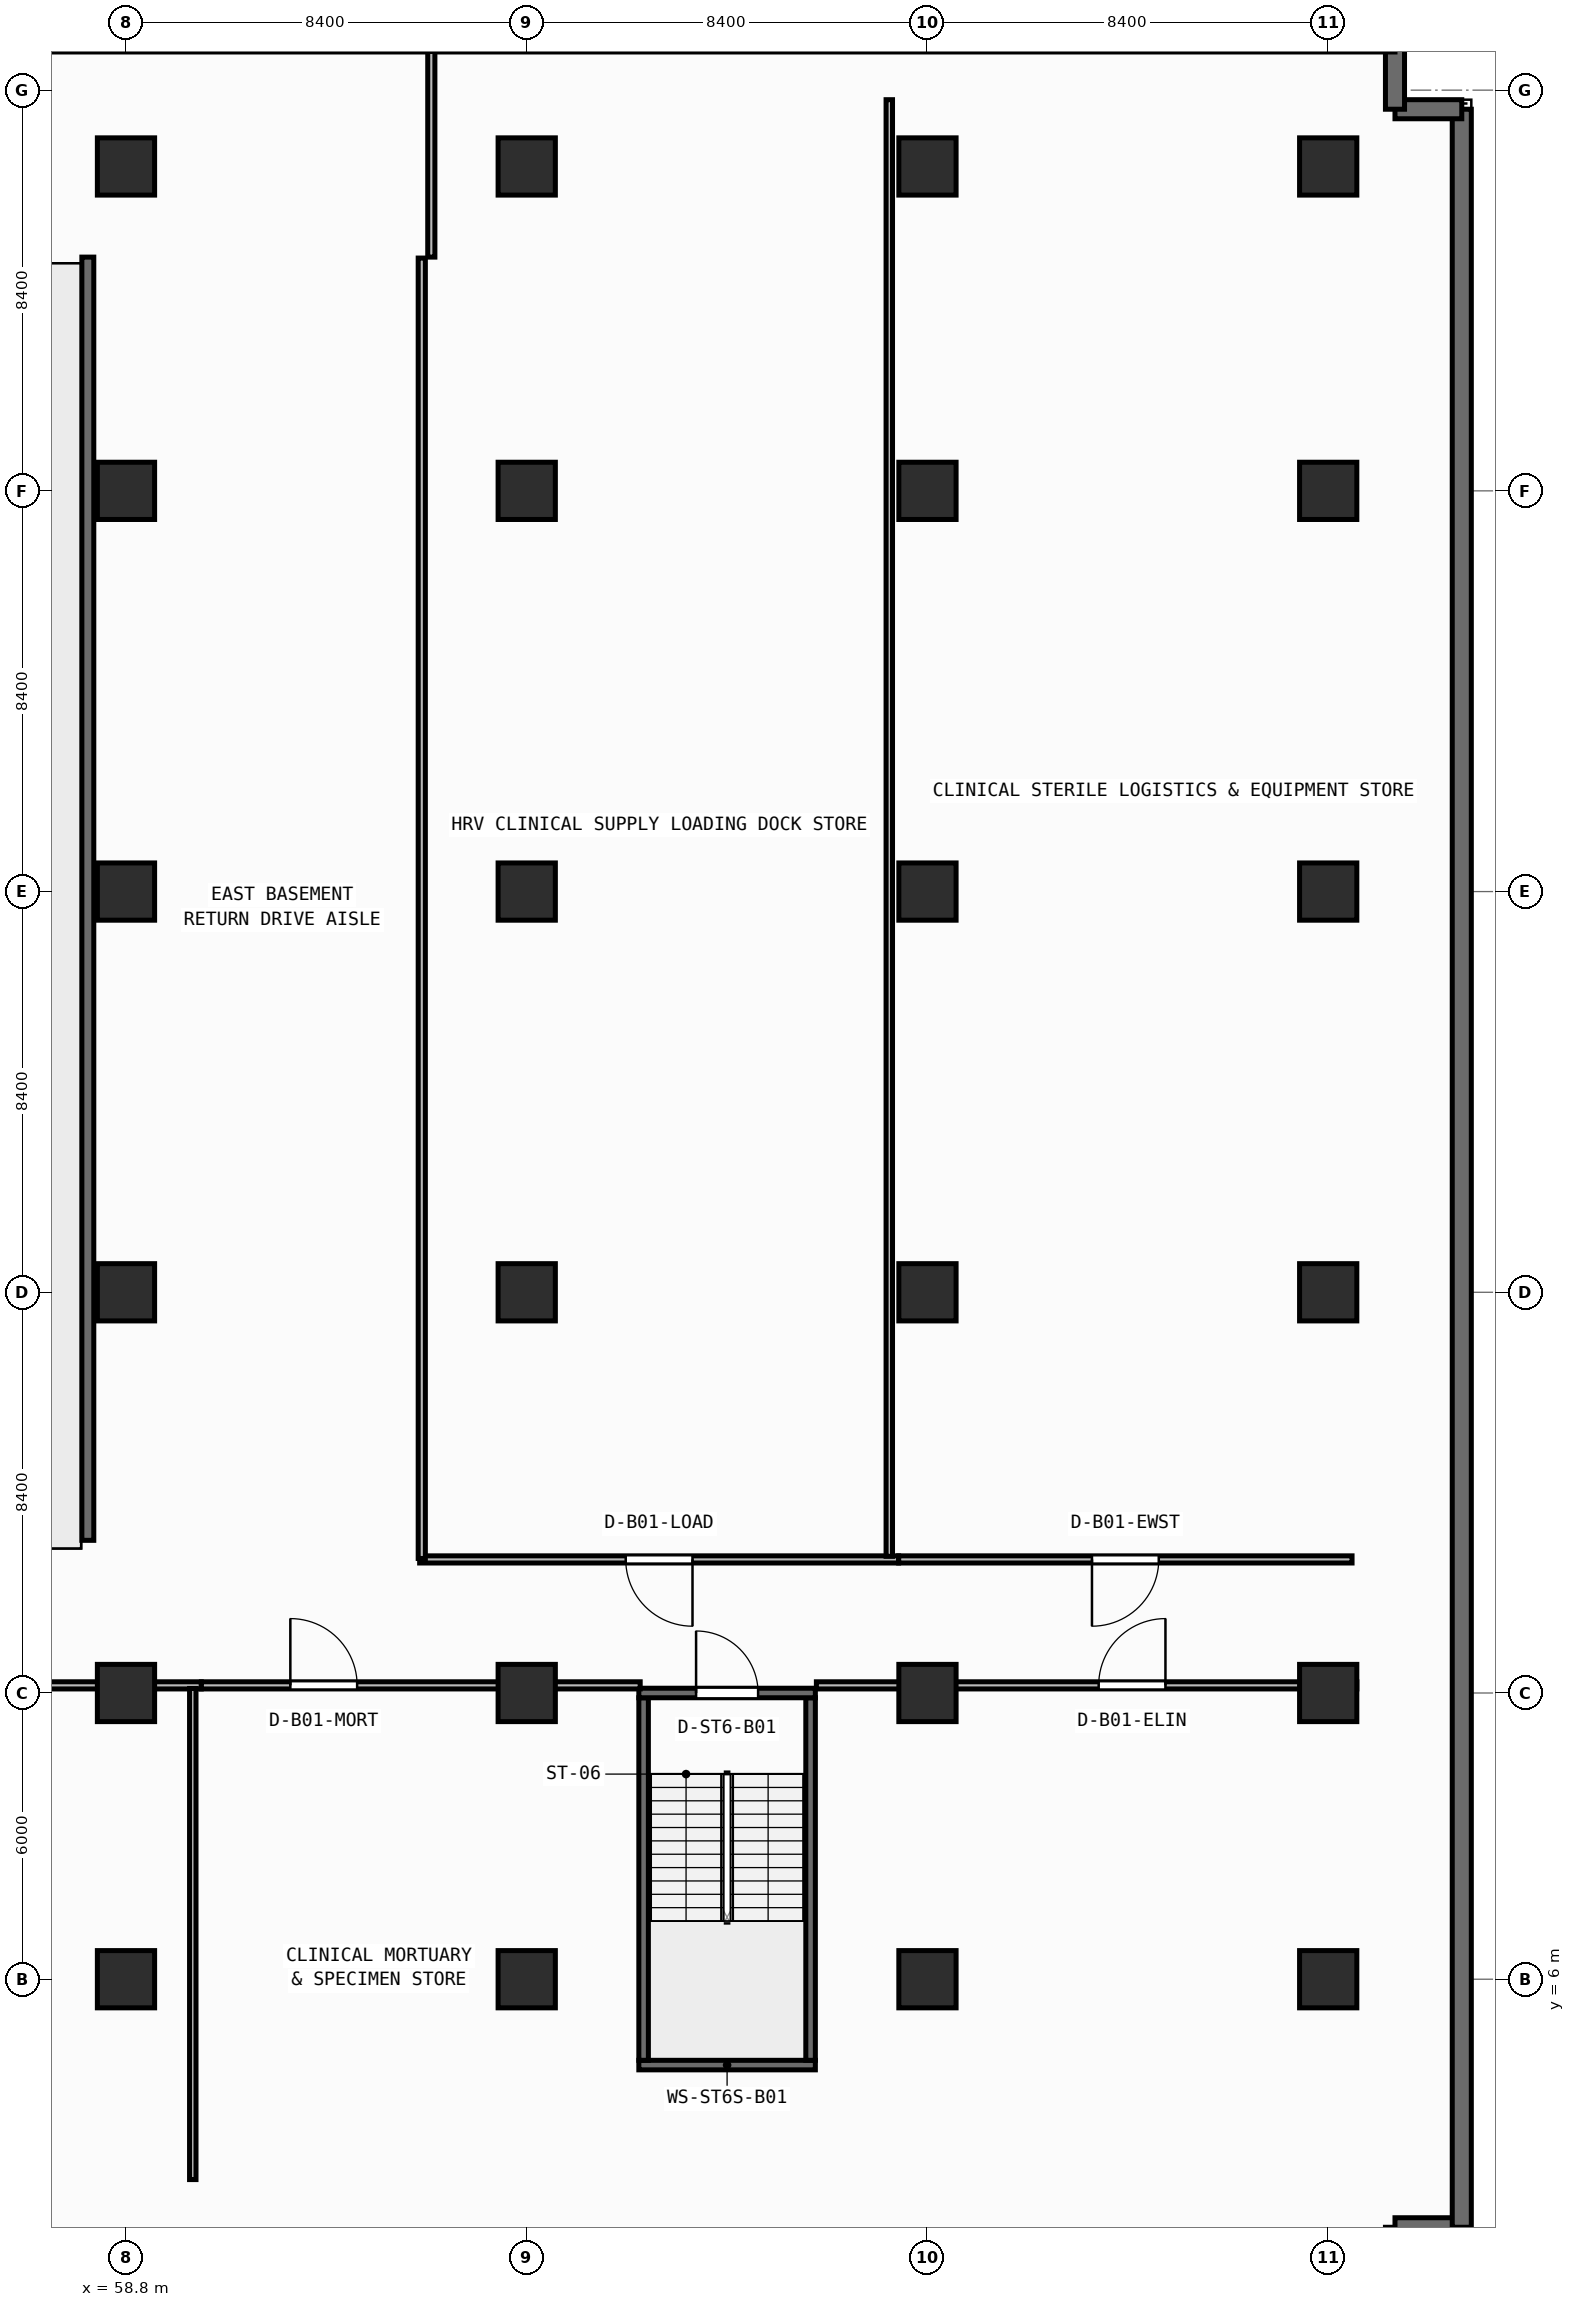
"""IFC4 building model, lengths in metres.
Left out: names, types, materials, properties, quantities, classifications, styles, units other than length and angle.
Written with IfcOpenShell. Run it as: python <this file> out.ifc"""

import sys

from ifc_helpers import new_model, si_unit, direction, frame, frame_2d, origin, origin_2d, place, context, subcontext, project, spatial, rectangle, extrude, element, fill, save


model = new_model("IFC4")
c1 = context("Model", 3, precision=1e-05, world=origin(), true_north=direction((0.0, 1.0)))
c2 = subcontext(c1, "Body", "Model", "MODEL_VIEW")
j1 = project(units=[si_unit("LENGTHUNIT", "METRE"), si_unit("PLANEANGLEUNIT", "RADIAN")], contexts=[c1])
p1 = place(None, origin())
s1 = spatial("IfcSite", under=j1, at=p1, CompositionType="ELEMENT")
p2 = place(p1, origin())
s2 = spatial("IfcBuilding", under=s1, at=p2, CompositionType="ELEMENT")
p3 = place(p2, frame((0.0, 0.0, -4.5)))
s3 = spatial("IfcBuildingStorey", under=s2, at=p3, CompositionType="ELEMENT", Elevation=-4.5)
for number, where, z_axis, x_axis in (
    (1, (58.8, 6.0, 0.0), (0.0, 0.0, 1.0), (1.0, 0.0, 0.0)),
    (2, (67.2, 6.0, 0.0), (0.0, 0.0, 1.0), (1.0, 0.0, 0.0)),
    (3, (75.6, 6.0, 0.0), (0.0, 0.0, 1.0), (1.0, 0.0, 0.0)),
    (4, (84.0, 6.0, 0.0), (0.0, 0.0, 1.0), (1.0, 0.0, 0.0)),
    (5, (58.8, 12.0, 0.0), (0.0, 0.0, 1.0), (1.0, 0.0, 0.0)),
    (6, (67.2, 12.0, 0.0), (0.0, 0.0, 1.0), (1.0, 0.0, 0.0)),
    (7, (75.6, 12.0, 0.0), (0.0, 0.0, 1.0), (1.0, 0.0, 0.0)),
    (8, (84.0, 12.0, 0.0), (0.0, 0.0, 1.0), (1.0, 0.0, 0.0)),
    (9, (58.8, 20.4, 0.0), (0.0, 0.0, 1.0), (1.0, 0.0, 0.0)),
    (10, (67.2, 20.4, 0.0), (0.0, 0.0, 1.0), (1.0, 0.0, 0.0)),
    (11, (75.6, 20.4, 0.0), (0.0, 0.0, 1.0), (1.0, 0.0, 0.0)),
    (12, (84.0, 20.4, 0.0), (0.0, 0.0, 1.0), (1.0, 0.0, 0.0)),
    (13, (58.8, 28.8, 0.0), (0.0, 0.0, 1.0), (1.0, 0.0, 0.0)),
    (14, (67.2, 28.8, 0.0), (0.0, 0.0, 1.0), (1.0, 0.0, 0.0)),
    (15, (75.6, 28.8, 0.0), (0.0, 0.0, 1.0), (1.0, 0.0, 0.0)),
    (16, (84.0, 28.8, 0.0), (0.0, 0.0, 1.0), (1.0, 0.0, 0.0)),
    (17, (58.8, 37.2, 0.0), (0.0, 0.0, 1.0), (1.0, 0.0, 0.0)),
    (18, (67.2, 37.2, 0.0), (0.0, 0.0, 1.0), (1.0, 0.0, 0.0)),
    (19, (75.6, 37.2, 0.0), (0.0, 0.0, 1.0), (1.0, 0.0, 0.0)),
    (20, (84.0, 37.2, 0.0), (0.0, 0.0, 1.0), (1.0, 0.0, 0.0)),
    (21, (58.8, 44.0, 0.0), (0.0, 0.0, 1.0), (1.0, 0.0, 0.0)),
    (22, (67.2, 44.0, 0.0), (0.0, 0.0, 1.0), (1.0, 0.0, 0.0)),
    (23, (75.6, 44.0, 0.0), (0.0, 0.0, 1.0), (1.0, 0.0, 0.0)),
    (24, (84.0, 44.0, 0.0), (0.0, 0.0, 1.0), (1.0, 0.0, 0.0)),
):
    element("IfcColumn", number, at=place(p3, frame(where, z_axis=z_axis, x_axis=x_axis)), inside=s3, PredefinedType="COLUMN", context=c2, shape_type="SweptSolid", body=[
        extrude(rectangle(XDim=1.2, YDim=1.2, at=origin_2d()), origin(), (0.0, 0.0, 1.0), 4.5),
    ])
for number, where, z_axis, x_axis in (
    (25, (85.4, -0.6, 0.0), (0.0, 0.0, 1.0), (0.0, 1.0, 0.0)),
    (26, (85.4, 0.8, 0.0), (0.0, 0.0, 1.0), (1.0, 0.0, 0.0)),
):
    element("IfcWall", number, at=place(p3, frame(where, z_axis=z_axis, x_axis=x_axis)), inside=s3, PredefinedType="STANDARD", context=c2, shape_type="SweptSolid", body=[
        extrude(rectangle(XDim=1.4, YDim=0.4, at=frame_2d((0.7, 0.0))), origin(), (0.0, 0.0, 1.0), 4.25),
    ])
p4 = place(p3, frame((86.8, 0.8, 0.0), z_axis=(0.0, 0.0, 1.0), x_axis=(0.0, 1.0, 0.0)))
e27 = element("IfcWall", 27, at=p4, inside=s3, PredefinedType="STANDARD", context=c2, shape_type="SweptSolid", body=[
    extrude(rectangle(XDim=44.4, YDim=0.4, at=frame_2d((22.2, 0.0))), origin(), (0.0, 0.0, 1.0), 4.25),
])
for number, where, z_axis, x_axis in (
    (28, (86.8, 45.2, 0.0), (0.0, 0.0, 1.0), (-1.0, 0.0, 0.0)),
    (29, (85.4, 45.2, 0.0), (0.0, 0.0, 1.0), (0.0, 1.0, 0.0)),
):
    element("IfcWall", number, at=place(p3, frame(where, z_axis=z_axis, x_axis=x_axis)), inside=s3, PredefinedType="STANDARD", context=c2, shape_type="SweptSolid", body=[
        extrude(rectangle(XDim=1.4, YDim=0.4, at=frame_2d((0.7, 0.0))), origin(), (0.0, 0.0, 1.0), 4.25),
    ])
p5 = place(p3, frame((69.55, 4.2, 0.0), z_axis=(0.0, 0.0, 1.0), x_axis=(1.0, 0.0, 0.0)))
e30 = element("IfcWall", 30, at=p5, inside=s3, PredefinedType="SHEAR", context=c2, shape_type="SweptSolid", body=[
    extrude(rectangle(XDim=3.7, YDim=0.2, at=frame_2d((1.85, 0.0))), origin(), (0.0, 0.0, 1.0), 4.25),
])
for number, where, z_axis, x_axis in (
    (31, (69.65, 4.3, 0.0), (0.0, 0.0, 1.0), (0.0, 1.0, 0.0)),
    (32, (73.15, 4.3, 0.0), (0.0, 0.0, 1.0), (0.0, 1.0, 0.0)),
):
    element("IfcWall", number, at=place(p3, frame(where, z_axis=z_axis, x_axis=x_axis)), inside=s3, PredefinedType="SHEAR", context=c2, shape_type="SweptSolid", body=[
        extrude(rectangle(XDim=7.6, YDim=0.2, at=frame_2d((3.8, 0.0))), origin(), (0.0, 0.0, 1.0), 4.25),
    ])
p6 = place(p3, frame((69.55, 12.0, 0.0), z_axis=(0.0, 0.0, 1.0), x_axis=(1.0, 0.0, 0.0)))
e33 = element("IfcWall", 33, at=p6, inside=s3, PredefinedType="SHEAR", context=c2, shape_type="SweptSolid", body=[
    extrude(rectangle(XDim=3.7, YDim=0.2, at=frame_2d((1.85, 0.0))), origin(), (0.0, 0.0, 1.0), 4.25),
])
p7 = place(p6, frame((1.2, 0.0, 0.0)))
e34 = element("IfcOpeningElement", 34, at=p7, cuts=e33, PredefinedType="OPENING", context=c2, shape_type="SweptSolid", body=[
    extrude(rectangle(XDim=1.3, YDim=2.15, at=frame_2d((0.65, 1.075))), frame((0.0, 0.11, 0.0), z_axis=(0.0, -1.0, 0.0), x_axis=(1.0, 0.0, 0.0)), (0.0, 0.0, 1.0), 0.22),
])
p8 = place(p3, frame((58.0, 15.2, 0.0), z_axis=(0.0, 0.0, 1.0), x_axis=(0.0, 1.0, 0.0)))
e35 = element("IfcWall", 35, at=p8, inside=s3, PredefinedType="SHEAR", context=c2, shape_type="SweptSolid", body=[
    extrude(rectangle(XDim=26.9, YDim=0.25, at=frame_2d((13.45, 0.0))), origin(), (0.0, 0.0, 1.0), 4.25),
])
p9 = place(p3, frame((49.622, 12.16, 0.0), z_axis=(0.0, 0.0, 1.0), x_axis=(1.0, 0.0, 0.0)))
e36 = element("IfcWall", 36, at=p9, inside=s3, PredefinedType="PARTITIONING", context=c2, shape_type="SweptSolid", body=[
    extrude(rectangle(XDim=10.757, YDim=0.15, at=frame_2d((5.378, 0.0))), origin(), (0.0, 0.0, 1.0), 3.315),
])
p10 = place(p9, frame((4.134, 0.0, 0.0)))
e37 = element("IfcOpeningElement", 37, at=p10, cuts=e36, PredefinedType="OPENING", context=c2, shape_type="SweptSolid", body=[
    extrude(rectangle(XDim=1.1, YDim=2.1, at=frame_2d((0.55, 1.05))), frame((0.0, 0.085, 0.0), z_axis=(0.0, -1.0, 0.0), x_axis=(1.0, 0.0, 0.0)), (0.0, 0.0, 1.0), 0.17),
])
p11 = place(p3, frame((60.381, 12.16, 0.0), z_axis=(0.0, 0.0, 1.0), x_axis=(1.0, 0.0, 0.0)))
e38 = element("IfcWall", 38, at=p11, inside=s3, PredefinedType="PARTITIONING", context=c2, shape_type="SweptSolid", body=[
    extrude(rectangle(XDim=9.198, YDim=0.15, at=frame_2d((4.599, 0.0))), origin(), (0.0, 0.0, 1.0), 3.315),
])
p12 = place(p11, frame((1.865, 0.0, 0.0)))
e39 = element("IfcOpeningElement", 39, at=p12, cuts=e38, PredefinedType="OPENING", context=c2, shape_type="SweptSolid", body=[
    extrude(rectangle(XDim=1.4, YDim=2.15, at=frame_2d((0.7, 1.075))), frame((0.0, 0.085, 0.0), z_axis=(0.0, -1.0, 0.0), x_axis=(1.0, 0.0, 0.0)), (0.0, 0.0, 1.0), 0.17),
])
p13 = place(p3, frame((73.271, 12.16, 0.0), z_axis=(0.0, 0.0, 1.0), x_axis=(1.0, 0.0, 0.0)))
e40 = element("IfcWall", 40, at=p13, inside=s3, PredefinedType="PARTITIONING", context=c2, shape_type="SweptSolid", body=[
    extrude(rectangle(XDim=11.329, YDim=0.15, at=frame_2d((5.664, 0.0))), origin(), (0.0, 0.0, 1.0), 3.315),
])
p14 = place(p13, frame((5.917, 0.0, 0.0)))
e41 = element("IfcOpeningElement", 41, at=p14, cuts=e40, PredefinedType="OPENING", context=c2, shape_type="SweptSolid", body=[
    extrude(rectangle(XDim=1.4, YDim=2.15, at=frame_2d((0.7, 1.075))), frame((0.0, 0.085, 0.0), z_axis=(0.0, -1.0, 0.0), x_axis=(1.0, 0.0, 0.0)), (0.0, 0.0, 1.0), 0.17),
])
p15 = place(p3, frame((74.995, 14.8, 0.0), z_axis=(0.0, 0.0, 1.0), x_axis=(-1.0, 0.0, 0.0)))
e42 = element("IfcWall", 42, at=p15, inside=s3, PredefinedType="PARTITIONING", context=c2, shape_type="SweptSolid", body=[
    extrude(rectangle(XDim=10.039, YDim=0.15, at=frame_2d((5.02, 0.0))), origin(), (0.0, 0.0, 1.0), 4.25),
])
p16 = place(p15, frame((4.32, 0.0, 0.0)))
e43 = element("IfcOpeningElement", 43, at=p16, cuts=e42, PredefinedType="OPENING", context=c2, shape_type="SweptSolid", body=[
    extrude(rectangle(XDim=1.4, YDim=2.15, at=frame_2d((0.7, 1.075))), frame((0.0, 0.085, 0.0), z_axis=(0.0, -1.0, 0.0), x_axis=(1.0, 0.0, 0.0)), (0.0, 0.0, 1.0), 0.17),
])
p17 = place(p3, frame((84.5, 14.8, 0.0), z_axis=(0.0, 0.0, 1.0), x_axis=(-1.0, 0.0, 0.0)))
e44 = element("IfcWall", 44, at=p17, inside=s3, PredefinedType="PARTITIONING", context=c2, shape_type="SweptSolid", body=[
    extrude(rectangle(XDim=9.503, YDim=0.15, at=frame_2d((4.752, 0.0))), origin(), (0.0, 0.0, 1.0), 4.25),
])
p18 = place(p17, frame((4.052, 0.0, 0.0)))
e45 = element("IfcOpeningElement", 45, at=p18, cuts=e44, PredefinedType="OPENING", context=c2, shape_type="SweptSolid", body=[
    extrude(rectangle(XDim=1.4, YDim=2.15, at=frame_2d((0.7, 1.075))), frame((0.0, 0.085, 0.0), z_axis=(0.0, -1.0, 0.0), x_axis=(1.0, 0.0, 0.0)), (0.0, 0.0, 1.0), 0.17),
])
p19 = place(p3, frame((65.2, 42.1, 0.0), z_axis=(0.0, 0.0, 1.0), x_axis=(0.0, 1.0, 0.0)))
e46 = element("IfcWall", 46, at=p19, inside=s3, PredefinedType="PARTITIONING", context=c2, shape_type="SweptSolid", body=[
    extrude(rectangle(XDim=4.31, YDim=0.15, at=frame_2d((2.155, 0.0))), origin(), (0.0, 0.0, 1.0), 4.25),
])
p20 = place(p3, frame((65.0, 14.82, 0.0), z_axis=(0.0, 0.0, 1.0), x_axis=(0.0, 1.0, 0.0)))
e47 = element("IfcWall", 47, at=p20, inside=s3, PredefinedType="PARTITIONING", context=c2, shape_type="SweptSolid", body=[
    extrude(rectangle(XDim=27.26, YDim=0.15, at=frame_2d((13.63, 0.0))), origin(), (0.0, 0.0, 1.0), 4.25),
])
p21 = place(p3, frame((60.2, 1.8, 0.0), z_axis=(0.0, 0.0, 1.0), x_axis=(0.0, 1.0, 0.0)))
e48 = element("IfcWall", 48, at=p21, inside=s3, PredefinedType="PARTITIONING", context=c2, shape_type="SweptSolid", body=[
    extrude(rectangle(XDim=10.295, YDim=0.135, at=frame_2d((5.147, 0.0))), origin(), (0.0, 0.0, 1.0), 4.25),
])
p22 = place(p3, frame((74.8, 14.865, 0.0), z_axis=(0.0, 0.0, 1.0), x_axis=(0.0, 1.0, 0.0)))
e49 = element("IfcWall", 49, at=p22, inside=s3, PredefinedType="PARTITIONING", context=c2, shape_type="SweptSolid", body=[
    extrude(rectangle(XDim=30.535, YDim=0.135, at=frame_2d((15.268, 0.0))), origin(), (0.0, 0.0, 1.0), 4.25),
])
p23 = place(p7, origin())
e50 = element("IfcDoor", 50, at=p23, inside=s3, OperationType="SINGLE_SWING_LEFT", PredefinedType="DOOR", context=c2, shape_type="SweptSolid", body=[
    extrude(rectangle(XDim=1.3, YDim=2.15, at=frame_2d((0.65, 1.075))), frame((0.0, 0.025, 0.0), z_axis=(0.0, -1.0, 0.0), x_axis=(1.0, 0.0, 0.0)), (0.0, 0.0, 1.0), 0.05),
])
fill(e34, e50)
p24 = place(p12, origin())
e51 = element("IfcDoor", 51, at=p24, inside=s3, OperationType="SINGLE_SWING_LEFT", PredefinedType="DOOR", context=c2, shape_type="SweptSolid", body=[
    extrude(rectangle(XDim=1.4, YDim=2.15, at=frame_2d((0.7, 1.075))), frame((0.0, 0.025, 0.0), z_axis=(0.0, -1.0, 0.0), x_axis=(1.0, 0.0, 0.0)), (0.0, 0.0, 1.0), 0.05),
])
fill(e39, e51)
p25 = place(p14, origin())
e52 = element("IfcDoor", 52, at=p25, inside=s3, OperationType="SINGLE_SWING_RIGHT", PredefinedType="DOOR", context=c2, shape_type="SweptSolid", body=[
    extrude(rectangle(XDim=1.4, YDim=2.15, at=frame_2d((0.7, 1.075))), frame((0.0, 0.025, 0.0), z_axis=(0.0, -1.0, 0.0), x_axis=(1.0, 0.0, 0.0)), (0.0, 0.0, 1.0), 0.05),
])
fill(e41, e52)
p26 = place(p16, origin())
e53 = element("IfcDoor", 53, at=p26, inside=s3, OperationType="SINGLE_SWING_LEFT", PredefinedType="DOOR", context=c2, shape_type="SweptSolid", body=[
    extrude(rectangle(XDim=1.4, YDim=2.15, at=frame_2d((0.7, 1.075))), frame((0.0, 0.025, 0.0), z_axis=(0.0, -1.0, 0.0), x_axis=(1.0, 0.0, 0.0)), (0.0, 0.0, 1.0), 0.05),
])
fill(e43, e53)
p27 = place(p18, origin())
e54 = element("IfcDoor", 54, at=p27, inside=s3, OperationType="SINGLE_SWING_RIGHT", PredefinedType="DOOR", context=c2, shape_type="SweptSolid", body=[
    extrude(rectangle(XDim=1.4, YDim=2.15, at=frame_2d((0.7, 1.075))), frame((0.0, 0.025, 0.0), z_axis=(0.0, -1.0, 0.0), x_axis=(1.0, 0.0, 0.0)), (0.0, 0.0, 1.0), 0.05),
])
fill(e45, e54)
save(model, sys.argv[1])
